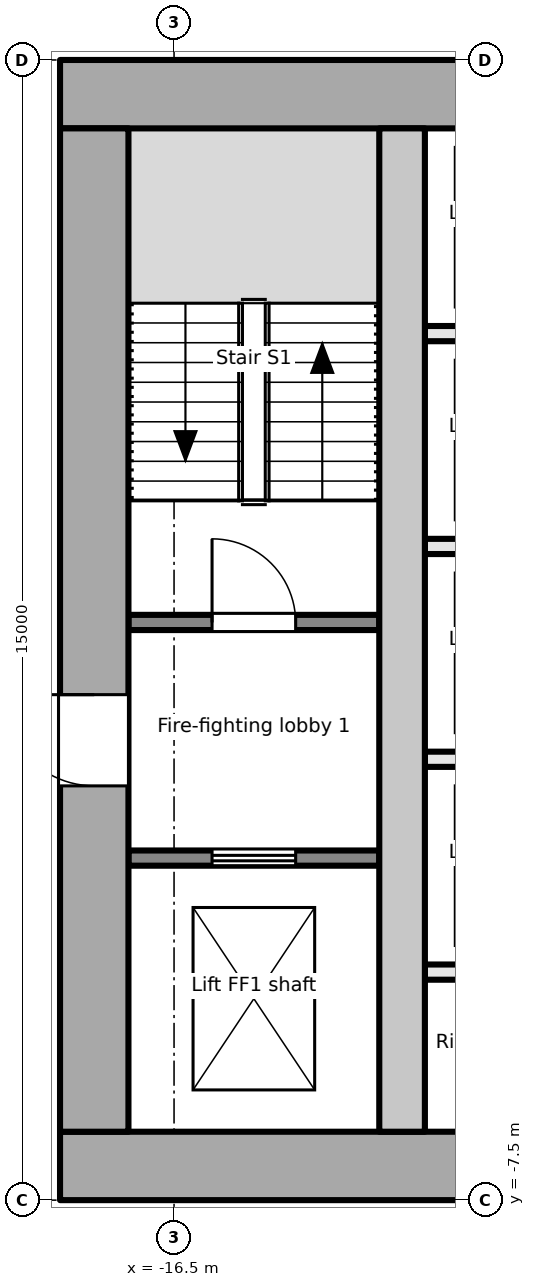
"""IFC4 building model, lengths in metres.
Left out: names, types, materials, properties, quantities, classifications, styles, units other than length and angle.
Written with IfcOpenShell. Run it as: python <this file> out.ifc"""

import sys

from ifc_helpers import new_model, si_unit, direction, frame, frame_2d, origin, place, context, subcontext, project, spatial, rectangle, extrude, element, fill, save


model = new_model("IFC4")
c1 = context("Model", 3, precision=1e-05, world=origin(), true_north=direction((0.0, 1.0)))
c2 = subcontext(c1, "Body", "Model", "MODEL_VIEW")
j1 = project(units=[si_unit("LENGTHUNIT", "METRE"), si_unit("PLANEANGLEUNIT", "RADIAN")], contexts=[c1])
p1 = place(None, origin())
s1 = spatial("IfcSite", under=j1, at=p1, CompositionType="ELEMENT")
p2 = place(p1, origin())
s2 = spatial("IfcBuilding", under=s1, at=p2, CompositionType="ELEMENT")
p3 = place(p2, frame((0.0, 0.0, 99.7)))
s3 = spatial("IfcBuildingStorey", under=s2, at=p3, CompositionType="ELEMENT", Elevation=99.7)
p4 = place(p3, frame((-18.0, -7.05, -0.2), z_axis=(0.0, 0.0, 1.0), x_axis=(1.0, 0.0, 0.0)))
e1 = element("IfcWall", 1, at=p4, inside=s3, PredefinedType="SHEAR", context=c2, shape_type="SweptSolid", body=[
    extrude(rectangle(XDim=36.0, YDim=0.9, at=frame_2d((18.0, 0.0))), origin(), (0.0, 0.0, 1.0), 4.0),
])
p5 = place(p4, frame((7.8, 0.0, 0.2)))
e2 = element("IfcOpeningElement", 2, at=p5, cuts=e1, PredefinedType="OPENING", context=c2, shape_type="SweptSolid", body=[
    extrude(rectangle(XDim=2.4, YDim=2.1, at=frame_2d((1.2, 1.05))), frame((0.0, 0.46, 0.0), z_axis=(0.0, -1.0, 0.0), x_axis=(1.0, 0.0, 0.0)), (0.0, 0.0, 1.0), 0.921),
])
p6 = place(p4, frame((17.4, 0.0, 0.2)))
e3 = element("IfcOpeningElement", 3, at=p6, cuts=e1, PredefinedType="OPENING", context=c2, shape_type="SweptSolid", body=[
    extrude(rectangle(XDim=1.2, YDim=2.1, at=frame_2d((0.6, 1.05))), frame((0.0, 0.46, 0.0), z_axis=(0.0, -1.0, 0.0), x_axis=(1.0, 0.0, 0.0)), (0.0, 0.0, 1.0), 0.921),
])
p7 = place(p4, frame((26.1, 0.0, 0.2)))
e4 = element("IfcOpeningElement", 4, at=p7, cuts=e1, PredefinedType="OPENING", context=c2, shape_type="SweptSolid", body=[
    extrude(rectangle(XDim=2.4, YDim=2.1, at=frame_2d((1.2, 1.05))), frame((0.0, 0.46, 0.0), z_axis=(0.0, -1.0, 0.0), x_axis=(1.0, 0.0, 0.0)), (0.0, 0.0, 1.0), 0.921),
])
p8 = place(p3, frame((-18.0, 7.05, -0.2), z_axis=(0.0, 0.0, 1.0), x_axis=(1.0, 0.0, 0.0)))
e5 = element("IfcWall", 5, at=p8, inside=s3, PredefinedType="SHEAR", context=c2, shape_type="SweptSolid", body=[
    extrude(rectangle(XDim=36.0, YDim=0.9, at=frame_2d((18.0, 0.0))), origin(), (0.0, 0.0, 1.0), 4.0),
])
p9 = place(p3, frame((-17.55, -6.6, -0.2), z_axis=(0.0, 0.0, 1.0), x_axis=(0.0, 1.0, 0.0)))
e6 = element("IfcWall", 6, at=p9, inside=s3, PredefinedType="SHEAR", context=c2, shape_type="SweptSolid", body=[
    extrude(rectangle(XDim=13.2, YDim=0.9, at=frame_2d((6.6, 0.0))), origin(), (0.0, 0.0, 1.0), 4.0),
])
p10 = place(p9, frame((4.55, 0.0, 0.2)))
e7 = element("IfcOpeningElement", 7, at=p10, cuts=e6, PredefinedType="OPENING", context=c2, shape_type="SweptSolid", body=[
    extrude(rectangle(XDim=1.2, YDim=2.1, at=frame_2d((0.6, 1.05))), frame((0.0, 0.46, 0.0), z_axis=(0.0, -1.0, 0.0), x_axis=(1.0, 0.0, 0.0)), (0.0, 0.0, 1.0), 0.921),
])
p11 = place(p3, frame((-13.5, -6.6, -0.2), z_axis=(0.0, 0.0, 1.0), x_axis=(0.0, 1.0, 0.0)))
e8 = element("IfcWall", 8, at=p11, inside=s3, PredefinedType="SHEAR", context=c2, shape_type="SweptSolid", body=[
    extrude(rectangle(XDim=13.2, YDim=0.6, at=frame_2d((6.6, 0.0))), origin(), (0.0, 0.0, 1.0), 4.0),
])
p12 = place(p3, frame((-17.1, -3.0, 0.0), z_axis=(0.0, 0.0, 1.0), x_axis=(1.0, 0.0, 0.0)))
e9 = element("IfcWall", 9, at=p12, inside=s3, PredefinedType="PARTITIONING", context=c2, shape_type="SweptSolid", body=[
    extrude(rectangle(XDim=3.3, YDim=0.2, at=frame_2d((1.65, 0.0))), origin(), (0.0, 0.0, 1.0), 3.8),
])
p13 = place(p12, frame((1.1, 0.0, 0.0)))
e10 = element("IfcOpeningElement", 10, at=p13, cuts=e9, PredefinedType="OPENING", context=c2, shape_type="SweptSolid", body=[
    extrude(rectangle(XDim=1.1, YDim=2.1, at=frame_2d((0.55, 1.05))), frame((0.0, 0.111, 0.0), z_axis=(0.0, -1.0, 0.0), x_axis=(1.0, 0.0, 0.0)), (0.0, 0.0, 1.0), 0.221),
])
p14 = place(p3, frame((-17.1, 0.1, 0.0), z_axis=(0.0, 0.0, 1.0), x_axis=(1.0, 0.0, 0.0)))
e11 = element("IfcWall", 11, at=p14, inside=s3, PredefinedType="PARTITIONING", context=c2, shape_type="SweptSolid", body=[
    extrude(rectangle(XDim=3.3, YDim=0.2, at=frame_2d((1.65, 0.0))), origin(), (0.0, 0.0, 1.0), 3.8),
])
p15 = place(p14, frame((1.1, 0.0, 0.0)))
e12 = element("IfcOpeningElement", 12, at=p15, cuts=e11, PredefinedType="OPENING", context=c2, shape_type="SweptSolid", body=[
    extrude(rectangle(XDim=1.1, YDim=2.1, at=frame_2d((0.55, 1.05))), frame((0.0, 0.111, 0.0), z_axis=(0.0, -1.0, 0.0), x_axis=(1.0, 0.0, 0.0)), (0.0, 0.0, 1.0), 0.221),
])
for number, where, z_axis, x_axis in (
    (13, (-13.2, -1.7, 0.0), (0.0, 0.0, 1.0), (1.0, 0.0, 0.0)),
    (14, (-13.2, 1.1, 0.0), (0.0, 0.0, 1.0), (1.0, 0.0, 0.0)),
    (15, (-13.2, 3.9, 0.0), (0.0, 0.0, 1.0), (1.0, 0.0, 0.0)),
    (16, (-13.2, -4.5, 0.0), (0.0, 0.0, 1.0), (1.0, 0.0, 0.0)),
):
    element("IfcWall", number, at=place(p3, frame(where, z_axis=z_axis, x_axis=x_axis)), inside=s3, PredefinedType="PARTITIONING", context=c2, shape_type="SweptSolid", body=[
        extrude(rectangle(XDim=2.3, YDim=0.2, at=frame_2d((1.15, 0.0))), origin(), (0.0, 0.0, 1.0), 3.8),
    ])
p16 = place(p13, origin())
e17 = element("IfcDoor", 17, at=p16, inside=s3, OperationType="DOUBLE_DOOR_SLIDING", PredefinedType="DOOR", context=c2, shape_type="SweptSolid", body=[
    extrude(rectangle(XDim=1.1, YDim=2.1, at=frame_2d((0.55, 1.05))), frame((0.0, 0.025, 0.0), z_axis=(0.0, -1.0, 0.0), x_axis=(1.0, 0.0, 0.0)), (0.0, 0.0, 1.0), 0.05),
])
fill(e10, e17)
p17 = place(p10, origin())
e18 = element("IfcDoor", 18, at=p17, inside=s3, OperationType="SINGLE_SWING_RIGHT", PredefinedType="DOOR", context=c2, shape_type="SweptSolid", body=[
    extrude(rectangle(XDim=1.2, YDim=2.1, at=frame_2d((0.6, 1.05))), frame((0.0, 0.025, 0.0), z_axis=(0.0, -1.0, 0.0), x_axis=(1.0, 0.0, 0.0)), (0.0, 0.0, 1.0), 0.05),
])
fill(e7, e18)
p18 = place(p15, origin())
e19 = element("IfcDoor", 19, at=p18, inside=s3, OperationType="SINGLE_SWING_LEFT", PredefinedType="DOOR", context=c2, shape_type="SweptSolid", body=[
    extrude(rectangle(XDim=1.1, YDim=2.1, at=frame_2d((0.55, 1.05))), frame((0.0, 0.025, 0.0), z_axis=(0.0, -1.0, 0.0), x_axis=(1.0, 0.0, 0.0)), (0.0, 0.0, 1.0), 0.05),
])
fill(e12, e19)
save(model, sys.argv[1])
